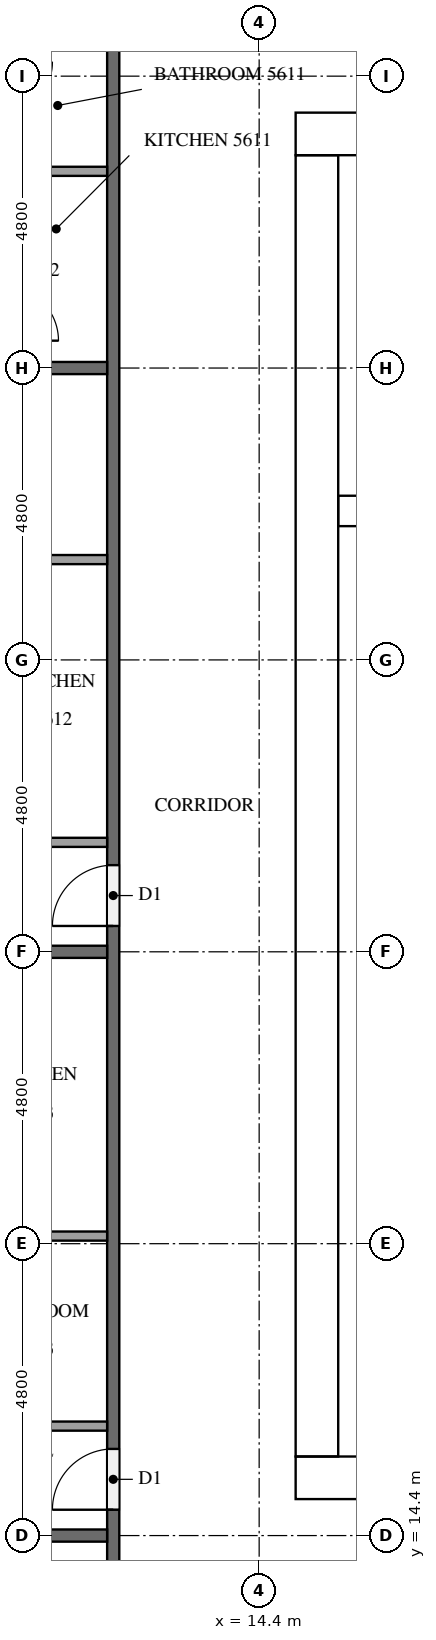
"""IFC4 building model, lengths in metres.
Left out: names, types, materials, properties, quantities, classifications, styles, units other than length and angle.
Written with IfcOpenShell. Run it as: python <this file> out.ifc"""

import sys

from ifc_helpers import new_model, si_unit, direction, frame, frame_2d, origin, place, context, subcontext, project, spatial, rectangle, extrude, element, fill, save


model = new_model("IFC4")
c1 = context("Model", 3, precision=1e-05, world=origin(), true_north=direction((0.0, 1.0)))
c2 = subcontext(c1, "Body", "Model", "MODEL_VIEW")
j1 = project(units=[si_unit("LENGTHUNIT", "METRE"), si_unit("PLANEANGLEUNIT", "RADIAN")], contexts=[c1])
p1 = place(None, origin())
s1 = spatial("IfcSite", under=j1, at=p1, CompositionType="ELEMENT")
p2 = place(p1, origin())
s2 = spatial("IfcBuilding", under=s1, at=p2, CompositionType="ELEMENT")
p3 = place(p2, frame((0.0, 0.0, 215.8)))
s3 = spatial("IfcBuildingStorey", under=s2, at=p3, CompositionType="ELEMENT", Elevation=215.8)
p4 = place(p3, frame((15.0, 15.35, 0.0), z_axis=(0.0, 0.0, 1.0), x_axis=(1.0, 0.0, 0.0)))
e1 = element("IfcWall", 1, at=p4, inside=s3, PredefinedType="SHEAR", context=c2, shape_type="SweptSolid", body=[
    extrude(rectangle(XDim=32.4, YDim=0.7, at=frame_2d((16.2, 0.0))), origin(), (0.0, 0.0, 1.0), 3.2),
])
p5 = place(p4, frame((15.3, 0.0, 0.0)))
e2 = element("IfcOpeningElement", 2, at=p5, cuts=e1, PredefinedType="OPENING", context=c2, shape_type="SweptSolid", body=[
    extrude(rectangle(XDim=1.8, YDim=2.1, at=frame_2d((0.9, 1.05))), frame((0.0, 0.36, 0.0), z_axis=(0.0, -1.0, 0.0), x_axis=(1.0, 0.0, 0.0)), (0.0, 0.0, 1.0), 0.72),
])
p6 = place(p3, frame((15.0, 37.45, 0.0), z_axis=(0.0, 0.0, 1.0), x_axis=(1.0, 0.0, 0.0)))
e3 = element("IfcWall", 3, at=p6, inside=s3, PredefinedType="SHEAR", context=c2, shape_type="SweptSolid", body=[
    extrude(rectangle(XDim=32.4, YDim=0.7, at=frame_2d((16.2, 0.0))), origin(), (0.0, 0.0, 1.0), 3.2),
])
p7 = place(p6, frame((15.3, 0.0, 0.0)))
e4 = element("IfcOpeningElement", 4, at=p7, cuts=e3, PredefinedType="OPENING", context=c2, shape_type="SweptSolid", body=[
    extrude(rectangle(XDim=1.8, YDim=2.1, at=frame_2d((0.9, 1.05))), frame((0.0, 0.36, 0.0), z_axis=(0.0, -1.0, 0.0), x_axis=(1.0, 0.0, 0.0)), (0.0, 0.0, 1.0), 0.72),
])
p8 = place(p6, frame((1.544, 0.0, 0.0)))
e5 = element("IfcOpeningElement", 5, at=p8, cuts=e3, PredefinedType="OPENING", context=c2, shape_type="SweptSolid", body=[
    extrude(rectangle(XDim=1.0, YDim=2.1, at=frame_2d((0.5, 1.05))), frame((0.0, 0.36, 0.0), z_axis=(0.0, -1.0, 0.0), x_axis=(1.0, 0.0, 0.0)), (0.0, 0.0, 1.0), 0.72),
])
p9 = place(p6, frame((5.219, 0.0, 0.0)))
e6 = element("IfcOpeningElement", 6, at=p9, cuts=e3, PredefinedType="OPENING", context=c2, shape_type="SweptSolid", body=[
    extrude(rectangle(XDim=1.0, YDim=2.1, at=frame_2d((0.5, 1.05))), frame((0.0, 0.36, 0.0), z_axis=(0.0, -1.0, 0.0), x_axis=(1.0, 0.0, 0.0)), (0.0, 0.0, 1.0), 0.72),
])
p10 = place(p3, frame((15.35, 15.7, 0.0), z_axis=(0.0, 0.0, 1.0), x_axis=(0.0, 1.0, 0.0)))
e7 = element("IfcWall", 7, at=p10, inside=s3, PredefinedType="SHEAR", context=c2, shape_type="SweptSolid", body=[
    extrude(rectangle(XDim=21.4, YDim=0.7, at=frame_2d((10.7, 0.0))), origin(), (0.0, 0.0, 1.0), 3.2),
])
p11 = place(p10, frame((5.06, 0.0, 0.0)))
e8 = element("IfcOpeningElement", 8, at=p11, cuts=e7, PredefinedType="OPENING", context=c2, shape_type="SweptSolid", body=[
    extrude(rectangle(XDim=1.2, YDim=2.1, at=frame_2d((0.6, 1.05))), frame((0.0, 0.36, 0.0), z_axis=(0.0, -1.0, 0.0), x_axis=(1.0, 0.0, 0.0)), (0.0, 0.0, 1.0), 0.72),
])
p12 = place(p3, frame((15.7, 31.25, 0.0), z_axis=(0.0, 0.0, 1.0), x_axis=(1.0, 0.0, 0.0)))
e9 = element("IfcWall", 9, at=p12, inside=s3, PredefinedType="SHEAR", context=c2, shape_type="SweptSolid", body=[
    extrude(rectangle(XDim=7.15, YDim=0.5, at=frame_2d((3.575, 0.0))), origin(), (0.0, 0.0, 1.0), 3.2),
])
p13 = place(p3, frame((12.0, 12.1, 0.0), z_axis=(0.0, 0.0, 1.0), x_axis=(0.0, 1.0, 0.0)))
e10 = element("IfcWall", 10, at=p13, inside=s3, PredefinedType="PARTITIONING", context=c2, shape_type="SweptSolid", body=[
    extrude(rectangle(XDim=28.6, YDim=0.2, at=frame_2d((14.3, 0.0))), origin(), (0.0, 0.0, 1.0), 3.2),
])
p14 = place(p13, frame((27.275, 0.0, 0.0)))
e11 = element("IfcOpeningElement", 11, at=p14, cuts=e10, PredefinedType="OPENING", context=c2, shape_type="SweptSolid", body=[
    extrude(rectangle(XDim=1.0, YDim=2.1, at=frame_2d((0.5, 1.05))), frame((0.0, 0.11, 0.0), z_axis=(0.0, -1.0, 0.0), x_axis=(1.0, 0.0, 0.0)), (0.0, 0.0, 1.0), 0.22),
])
p15 = place(p13, frame((12.325, 0.0, 0.0)))
e12 = element("IfcOpeningElement", 12, at=p15, cuts=e10, PredefinedType="OPENING", context=c2, shape_type="SweptSolid", body=[
    extrude(rectangle(XDim=1.0, YDim=2.1, at=frame_2d((0.5, 1.05))), frame((0.0, 0.11, 0.0), z_axis=(0.0, -1.0, 0.0), x_axis=(1.0, 0.0, 0.0)), (0.0, 0.0, 1.0), 0.22),
])
p16 = place(p13, frame((2.725, 0.0, 0.0)))
e13 = element("IfcOpeningElement", 13, at=p16, cuts=e10, PredefinedType="OPENING", context=c2, shape_type="SweptSolid", body=[
    extrude(rectangle(XDim=1.0, YDim=2.1, at=frame_2d((0.5, 1.05))), frame((0.0, 0.11, 0.0), z_axis=(0.0, -1.0, 0.0), x_axis=(1.0, 0.0, 0.0)), (0.0, 0.0, 1.0), 0.22),
])
p17 = place(p13, frame((0.875, 0.0, 0.0)))
e14 = element("IfcOpeningElement", 14, at=p17, cuts=e10, PredefinedType="OPENING", context=c2, shape_type="SweptSolid", body=[
    extrude(rectangle(XDim=1.0, YDim=2.1, at=frame_2d((0.5, 1.05))), frame((0.0, 0.11, 0.0), z_axis=(0.0, -1.0, 0.0), x_axis=(1.0, 0.0, 0.0)), (0.0, 0.0, 1.0), 0.22),
])
for number, where, z_axis, x_axis in (
    (15, (4.9, 33.6, 0.0), (0.0, 0.0, 1.0), (1.0, 0.0, 0.0)),
    (16, (4.9, 24.0, 0.0), (0.0, 0.0, 1.0), (1.0, 0.0, 0.0)),
    (17, (4.9, 14.4, 0.0), (0.0, 0.0, 1.0), (1.0, 0.0, 0.0)),
):
    element("IfcWall", number, at=place(p3, frame(where, z_axis=z_axis, x_axis=x_axis)), inside=s3, PredefinedType="PARTITIONING", context=c2, shape_type="SweptSolid", body=[
        extrude(rectangle(XDim=7.0, YDim=0.2, at=frame_2d((3.5, 0.0))), origin(), (0.0, 0.0, 1.0), 3.2),
    ])
p18 = place(p3, frame((11.9, 36.835, 0.0), z_axis=(0.0, 0.0, 1.0), x_axis=(-1.0, 0.0, 0.0)))
e18 = element("IfcWall", 18, at=p18, inside=s3, PredefinedType="PARTITIONING", context=c2, shape_type="SweptSolid", body=[
    extrude(rectangle(XDim=1.625, YDim=0.15, at=frame_2d((0.812, 0.0))), origin(), (0.0, 0.0, 1.0), 3.2),
])
p19 = place(p3, frame((11.9, 30.45, 0.0), z_axis=(0.0, 0.0, 1.0), x_axis=(-1.0, 0.0, 0.0)))
e19 = element("IfcWall", 19, at=p19, inside=s3, PredefinedType="PARTITIONING", context=c2, shape_type="SweptSolid", body=[
    extrude(rectangle(XDim=1.775, YDim=0.15, at=frame_2d((0.887, 0.0))), origin(), (0.0, 0.0, 1.0), 3.2),
])
p20 = place(p3, frame((11.9, 25.8, 0.0), z_axis=(0.0, 0.0, 1.0), x_axis=(-1.0, 0.0, 0.0)))
e20 = element("IfcWall", 20, at=p20, inside=s3, PredefinedType="PARTITIONING", context=c2, shape_type="SweptSolid", body=[
    extrude(rectangle(XDim=1.925, YDim=0.15, at=frame_2d((0.962, 0.0))), origin(), (0.0, 0.0, 1.0), 3.2),
])
p21 = place(p3, frame((11.9, 19.325, 0.0), z_axis=(0.0, 0.0, 1.0), x_axis=(-1.0, 0.0, 0.0)))
e21 = element("IfcWall", 21, at=p21, inside=s3, PredefinedType="PARTITIONING", context=c2, shape_type="SweptSolid", body=[
    extrude(rectangle(XDim=2.375, YDim=0.15, at=frame_2d((1.188, 0.0))), origin(), (0.0, 0.0, 1.0), 3.2),
])
p22 = place(p3, frame((11.9, 16.2, 0.0), z_axis=(0.0, 0.0, 1.0), x_axis=(-1.0, 0.0, 0.0)))
e22 = element("IfcWall", 22, at=p22, inside=s3, PredefinedType="PARTITIONING", context=c2, shape_type="SweptSolid", body=[
    extrude(rectangle(XDim=2.525, YDim=0.15, at=frame_2d((1.262, 0.0))), origin(), (0.0, 0.0, 1.0), 3.2),
])
p23 = place(p11, frame((1.2, 0.0, 0.0), z_axis=(0.0, 0.0, 1.0), x_axis=(-1.0, 0.0, 0.0)))
e23 = element("IfcDoor", 23, at=p23, inside=s3, OperationType="SINGLE_SWING_LEFT", PredefinedType="DOOR", context=c2, shape_type="SweptSolid", body=[
    extrude(rectangle(XDim=1.2, YDim=2.1, at=frame_2d((0.6, 1.05))), frame((0.0, 0.025, 0.0), z_axis=(0.0, -1.0, 0.0), x_axis=(1.0, 0.0, 0.0)), (0.0, 0.0, 1.0), 0.05),
])
fill(e8, e23)
p24 = place(p15, origin())
e24 = element("IfcDoor", 24, at=p24, inside=s3, OperationType="SINGLE_SWING_LEFT", PredefinedType="DOOR", context=c2, shape_type="SweptSolid", body=[
    extrude(rectangle(XDim=1.0, YDim=2.1, at=frame_2d((0.5, 1.05))), frame((0.0, 0.025, 0.0), z_axis=(0.0, -1.0, 0.0), x_axis=(1.0, 0.0, 0.0)), (0.0, 0.0, 1.0), 0.05),
])
fill(e12, e24)
p25 = place(p16, origin())
e25 = element("IfcDoor", 25, at=p25, inside=s3, OperationType="SINGLE_SWING_LEFT", PredefinedType="DOOR", context=c2, shape_type="SweptSolid", body=[
    extrude(rectangle(XDim=1.0, YDim=2.1, at=frame_2d((0.5, 1.05))), frame((0.0, 0.025, 0.0), z_axis=(0.0, -1.0, 0.0), x_axis=(1.0, 0.0, 0.0)), (0.0, 0.0, 1.0), 0.05),
])
fill(e13, e25)
save(model, sys.argv[1])
